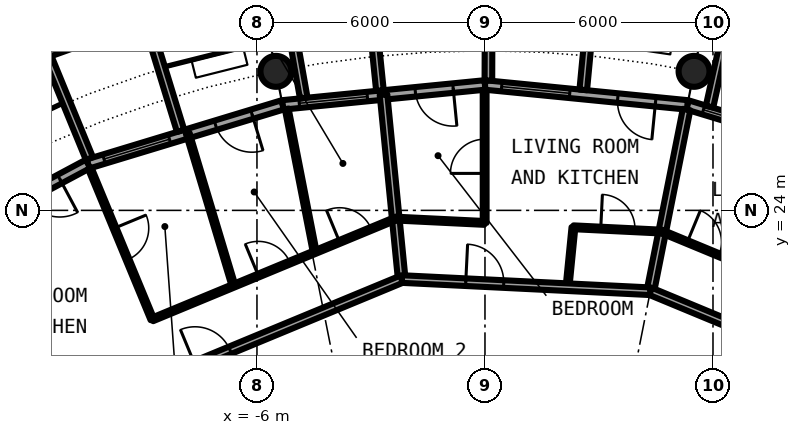
"""IFC4 building model, lengths in metres.
Left out: names, types, materials, properties, quantities, classifications, styles, units other than length and angle.
Written with IfcOpenShell. Run it as: python <this file> out.ifc"""

import sys

from ifc_helpers import new_model, si_unit, direction, frame, frame_2d, origin, origin_2d, place, context, subcontext, project, spatial, rectangle, circle, hollow_circle, extrude, element, fill, save


model = new_model("IFC4")
c1 = context("Model", 3, precision=1e-05, world=origin(), true_north=direction((0.0, 1.0)))
c2 = subcontext(c1, "Body", "Model", "MODEL_VIEW")
j1 = project(units=[si_unit("LENGTHUNIT", "METRE"), si_unit("PLANEANGLEUNIT", "RADIAN")], contexts=[c1])
p1 = place(None, origin())
s1 = spatial("IfcSite", under=j1, at=p1, CompositionType="ELEMENT")
p2 = place(p1, origin())
s2 = spatial("IfcBuilding", under=s1, at=p2, CompositionType="ELEMENT")
p3 = place(p2, frame((0.0, 0.0, 173.8)))
s3 = spatial("IfcBuildingStorey", under=s2, at=p3, CompositionType="ELEMENT", Elevation=173.8)
for number, where, z_axis, x_axis in (
    (1, (5.501, 27.658, 0.0), (0.0, 0.0, 1.0), (1.0, 0.0, 0.0)),
    (2, (-5.501, 27.658, 0.0), (0.0, 0.0, 1.0), (1.0, 0.0, 0.0)),
):
    element("IfcColumn", number, at=place(p3, frame(where, z_axis=z_axis, x_axis=x_axis)), inside=s3, PredefinedType="COLUMN", context=c2, shape_type="SweptSolid", body=[
        extrude(hollow_circle(Radius=0.406, WallThickness=0.04, at=origin_2d()), origin(), (0.0, 0.0, 1.0), 3.05),
    ])
p4 = place(p3, frame((10.447, 25.222, 0.0), z_axis=(0.0, 0.0, 1.0), x_axis=(-0.956965678721, 0.290201119486, 0.0)))
e3 = element("IfcWall", 3, at=p4, inside=s3, PredefinedType="SOLIDWALL", context=c2, shape_type="SweptSolid", body=[
    extrude(rectangle(XDim=5.351, YDim=0.25, at=frame_2d((2.676, 0.0))), origin(), (0.0, 0.0, 1.0), 2.7),
])
p5 = place(p4, frame((0.841, 0.0, 0.0)))
e4 = element("IfcOpeningElement", 4, at=p5, cuts=e3, PredefinedType="OPENING", context=c2, shape_type="SweptSolid", body=[
    extrude(rectangle(XDim=1.0, YDim=2.2, at=frame_2d((0.5, 1.1))), frame((0.0, 0.135, 0.0), z_axis=(0.0, -1.0, 0.0), x_axis=(1.0, 0.0, 0.0)), (0.0, 0.0, 1.0), 0.27),
])
p6 = place(p4, frame((3.111, 0.0, 0.3)))
e5 = element("IfcOpeningElement", 5, at=p6, cuts=e3, PredefinedType="OPENING", context=c2, shape_type="SweptSolid", body=[
    extrude(rectangle(XDim=1.8, YDim=2.1, at=frame_2d((0.9, 1.05))), frame((0.0, 0.135, 0.0), z_axis=(0.0, -1.0, 0.0), x_axis=(1.0, 0.0, 0.0)), (0.0, 0.0, 1.0), 0.27),
])
p7 = place(p3, frame((5.909, 26.729, -0.03), z_axis=(0.0, 0.0, 1.0), x_axis=(0.216409053917, 0.976302781612, 0.0)))
e6 = element("IfcWall", 6, at=p7, inside=s3, PredefinedType="SOLIDWALL", context=c2, shape_type="SweptSolid", body=[
    extrude(rectangle(XDim=2.925, YDim=0.2, at=frame_2d((1.463, 0.0))), origin(), (0.0, 0.0, 1.0), 2.73),
])
p8 = place(p3, frame((5.326, 26.775, 0.0), z_axis=(0.0, 0.0, 1.0), x_axis=(-0.995173996315, 0.098126026407, 0.0)))
e7 = element("IfcWall", 7, at=p8, inside=s3, PredefinedType="SOLIDWALL", context=c2, shape_type="SweptSolid", body=[
    extrude(rectangle(XDim=5.352, YDim=0.25, at=frame_2d((2.676, 0.0))), origin(), (0.0, 0.0, 1.0), 2.7),
])
p9 = place(p8, frame((0.841, 0.0, 0.0)))
e8 = element("IfcOpeningElement", 8, at=p9, cuts=e7, PredefinedType="OPENING", context=c2, shape_type="SweptSolid", body=[
    extrude(rectangle(XDim=1.0, YDim=2.2, at=frame_2d((0.5, 1.1))), frame((0.0, 0.135, 0.0), z_axis=(0.0, -1.0, 0.0), x_axis=(1.0, 0.0, 0.0)), (0.0, 0.0, 1.0), 0.27),
])
p10 = place(p8, frame((3.111, 0.0, 0.3)))
e9 = element("IfcOpeningElement", 9, at=p10, cuts=e7, PredefinedType="OPENING", context=c2, shape_type="SweptSolid", body=[
    extrude(rectangle(XDim=1.8, YDim=2.1, at=frame_2d((0.9, 1.05))), frame((0.0, 0.135, 0.0), z_axis=(0.0, -1.0, 0.0), x_axis=(1.0, 0.0, 0.0)), (0.0, 0.0, 1.0), 0.27),
])
p11 = place(p3, frame((2.586, 27.171, -0.03), z_axis=(0.0, 0.0, 1.0), x_axis=(0.094548432284, 0.995520262954, 0.0)))
e10 = element("IfcWall", 10, at=p11, inside=s3, PredefinedType="SOLIDWALL", context=c2, shape_type="SweptSolid", body=[
    extrude(rectangle(XDim=3.006, YDim=0.2, at=frame_2d((1.503, 0.0))), origin(), (0.0, 0.0, 1.0), 2.73),
])
p12 = place(p3, frame((0.09, 27.417, -0.03), z_axis=(0.0, 0.0, 1.0), x_axis=(0.00347308367, 0.999993968827, 0.0)))
e11 = element("IfcWall", 11, at=p12, inside=s3, PredefinedType="SOLIDWALL", context=c2, shape_type="SweptSolid", body=[
    extrude(rectangle(XDim=2.882, YDim=0.2, at=frame_2d((1.441, 0.0))), origin(), (0.0, 0.0, 1.0), 2.73),
])
p13 = place(p3, frame((0.0, 27.3, 0.0), z_axis=(0.0, 0.0, 1.0), x_axis=(-0.995173996315, -0.098126026407, 0.0)))
e12 = element("IfcWall", 12, at=p13, inside=s3, PredefinedType="SOLIDWALL", context=c2, shape_type="SweptSolid", body=[
    extrude(rectangle(XDim=5.352, YDim=0.25, at=frame_2d((2.676, 0.0))), origin(), (0.0, 0.0, 1.0), 2.7),
])
p14 = place(p13, frame((0.841, 0.0, 0.0)))
e13 = element("IfcOpeningElement", 13, at=p14, cuts=e12, PredefinedType="OPENING", context=c2, shape_type="SweptSolid", body=[
    extrude(rectangle(XDim=1.0, YDim=2.2, at=frame_2d((0.5, 1.1))), frame((0.0, 0.135, 0.0), z_axis=(0.0, -1.0, 0.0), x_axis=(1.0, 0.0, 0.0)), (0.0, 0.0, 1.0), 0.27),
])
p15 = place(p13, frame((3.111, 0.0, 0.3)))
e14 = element("IfcOpeningElement", 14, at=p15, cuts=e12, PredefinedType="OPENING", context=c2, shape_type="SweptSolid", body=[
    extrude(rectangle(XDim=1.8, YDim=2.1, at=frame_2d((0.9, 1.05))), frame((0.0, 0.135, 0.0), z_axis=(0.0, -1.0, 0.0), x_axis=(1.0, 0.0, 0.0)), (0.0, 0.0, 1.0), 0.27),
])
p16 = place(p3, frame((-2.764, 27.153, -0.03), z_axis=(0.0, 0.0, 1.0), x_axis=(-0.101505487237, 0.994834979311, 0.0)))
e15 = element("IfcWall", 15, at=p16, inside=s3, PredefinedType="SOLIDWALL", context=c2, shape_type="SweptSolid", body=[
    extrude(rectangle(XDim=3.007, YDim=0.2, at=frame_2d((1.503, 0.0))), origin(), (0.0, 0.0, 1.0), 2.73),
])
p17 = place(p3, frame((-4.769, 26.956, -0.03), z_axis=(0.0, 0.0, 1.0), x_axis=(-0.174056778901, 0.984735618183, 0.0)))
e16 = element("IfcWall", 16, at=p17, inside=s3, PredefinedType="SOLIDWALL", context=c2, shape_type="SweptSolid", body=[
    extrude(rectangle(XDim=2.925, YDim=0.2, at=frame_2d((1.462, 0.0))), origin(), (0.0, 0.0, 1.0), 2.73),
])
p18 = place(p3, frame((-5.326, 26.775, 0.0), z_axis=(0.0, 0.0, 1.0), x_axis=(-0.956965678721, -0.290201119486, 0.0)))
e17 = element("IfcWall", 17, at=p18, inside=s3, PredefinedType="SOLIDWALL", context=c2, shape_type="SweptSolid", body=[
    extrude(rectangle(XDim=5.351, YDim=0.25, at=frame_2d((2.676, 0.0))), origin(), (0.0, 0.0, 1.0), 2.7),
])
p19 = place(p18, frame((0.841, 0.0, 0.0)))
e18 = element("IfcOpeningElement", 18, at=p19, cuts=e17, PredefinedType="OPENING", context=c2, shape_type="SweptSolid", body=[
    extrude(rectangle(XDim=1.0, YDim=2.2, at=frame_2d((0.5, 1.1))), frame((0.0, 0.135, 0.0), z_axis=(0.0, -1.0, 0.0), x_axis=(1.0, 0.0, 0.0)), (0.0, 0.0, 1.0), 0.27),
])
p20 = place(p18, frame((3.111, 0.0, 0.3)))
e19 = element("IfcOpeningElement", 19, at=p20, cuts=e17, PredefinedType="OPENING", context=c2, shape_type="SweptSolid", body=[
    extrude(rectangle(XDim=1.8, YDim=2.1, at=frame_2d((0.9, 1.05))), frame((0.0, 0.135, 0.0), z_axis=(0.0, -1.0, 0.0), x_axis=(1.0, 0.0, 0.0)), (0.0, 0.0, 1.0), 0.27),
])
p21 = place(p3, frame((-8.82, 29.093, -0.03), z_axis=(0.0, 0.0, 1.0), x_axis=(-0.941461077774, -0.337121697664, 0.0)))
e20 = element("IfcWall", 20, at=p21, inside=s3, PredefinedType="SOLIDWALL", context=c2, shape_type="SweptSolid", body=[
    extrude(rectangle(XDim=2.993, YDim=0.2, at=frame_2d((1.497, 0.0))), origin(), (0.0, 0.0, 1.0), 2.73),
])
p22 = place(p21, frame((0.457, 0.0, 0.33)))
e21 = element("IfcOpeningElement", 21, at=p22, cuts=e20, PredefinedType="OPENING", context=c2, shape_type="SweptSolid", body=[
    extrude(circle(Radius=1.04, at=frame_2d((1.04, 1.04))), frame((0.0, 0.11, 0.0), z_axis=(0.0, -1.0, 0.0), x_axis=(1.0, 0.0, 0.0)), (0.0, 0.0, 1.0), 0.22),
])
p23 = place(p3, frame((-8.009, 26.092, -0.03), z_axis=(0.0, 0.0, 1.0), x_axis=(-0.293406695073, 0.955987715029, 0.0)))
e22 = element("IfcWall", 22, at=p23, inside=s3, PredefinedType="SOLIDWALL", context=c2, shape_type="SweptSolid", body=[
    extrude(rectangle(XDim=3.006, YDim=0.2, at=frame_2d((1.503, 0.0))), origin(), (0.0, 0.0, 1.0), 2.73),
])
p24 = place(p3, frame((-10.409, 25.364, -0.03), z_axis=(0.0, 0.0, 1.0), x_axis=(-0.379509886562, 0.925187681501, 0.0)))
e23 = element("IfcWall", 23, at=p24, inside=s3, PredefinedType="SOLIDWALL", context=c2, shape_type="SweptSolid", body=[
    extrude(rectangle(XDim=2.883, YDim=0.2, at=frame_2d((1.441, 0.0))), origin(), (0.0, 0.0, 1.0), 2.73),
])
p25 = place(p3, frame((-10.447, 25.222, 0.0), z_axis=(0.0, 0.0, 1.0), x_axis=(-0.881915646801, -0.471407246368, 0.0)))
e24 = element("IfcWall", 24, at=p25, inside=s3, PredefinedType="SOLIDWALL", context=c2, shape_type="SweptSolid", body=[
    extrude(rectangle(XDim=5.352, YDim=0.25, at=frame_2d((2.676, 0.0))), origin(), (0.0, 0.0, 1.0), 2.7),
])
p26 = place(p25, frame((0.841, 0.0, 0.0)))
e25 = element("IfcOpeningElement", 25, at=p26, cuts=e24, PredefinedType="OPENING", context=c2, shape_type="SweptSolid", body=[
    extrude(rectangle(XDim=1.0, YDim=2.2, at=frame_2d((0.5, 1.1))), frame((0.0, 0.135, 0.0), z_axis=(0.0, -1.0, 0.0), x_axis=(1.0, 0.0, 0.0)), (0.0, 0.0, 1.0), 0.27),
])
p27 = place(p25, frame((3.111, 0.0, 0.3)))
e26 = element("IfcOpeningElement", 26, at=p27, cuts=e24, PredefinedType="OPENING", context=c2, shape_type="SweptSolid", body=[
    extrude(rectangle(XDim=1.8, YDim=2.1, at=frame_2d((0.9, 1.05))), frame((0.0, 0.135, 0.0), z_axis=(0.0, -1.0, 0.0), x_axis=(1.0, 0.0, 0.0)), (0.0, 0.0, 1.0), 0.27),
])
p28 = place(p3, frame((-10.399, 25.106, 0.0), z_axis=(0.0, 0.0, 1.0), x_axis=(0.382689142274, -0.923877167369, 0.0)))
e27 = element("IfcWall", 27, at=p28, inside=s3, PredefinedType="PARTITIONING", context=c2, shape_type="SweptSolid", body=[
    extrude(rectangle(XDim=4.304, YDim=0.1, at=frame_2d((2.152, 0.0))), origin(), (0.0, 0.0, 1.0), 2.7),
])
p29 = place(p28, frame((1.702, 0.0, 0.0)))
e28 = element("IfcOpeningElement", 28, at=p29, cuts=e27, PredefinedType="OPENING", context=c2, shape_type="SweptSolid", body=[
    extrude(rectangle(XDim=0.9, YDim=2.3, at=frame_2d((0.45, 1.15))), frame((0.0, 0.06, 0.0), z_axis=(0.0, -1.0, 0.0), x_axis=(1.0, 0.0, 0.0)), (0.0, 0.0, 1.0), 0.12),
])
p30 = place(p3, frame((-7.821, 26.025, 0.0), z_axis=(0.0, 0.0, 1.0), x_axis=(0.287802539521, -0.957689771401, 0.0)))
e29 = element("IfcWall", 29, at=p30, inside=s3, PredefinedType="PARTITIONING", context=c2, shape_type="SweptSolid", body=[
    extrude(rectangle(XDim=4.187, YDim=0.1, at=frame_2d((2.094, 0.0))), origin(), (0.0, 0.0, 1.0), 2.7),
])
p31 = place(p3, frame((-5.217, 26.67, 0.0), z_axis=(0.0, 0.0, 1.0), x_axis=(0.192118055779, -0.981371821811, 0.0)))
e30 = element("IfcWall", 30, at=p31, inside=s3, PredefinedType="PARTITIONING", context=c2, shape_type="SweptSolid", body=[
    extrude(rectangle(XDim=3.842, YDim=0.1, at=frame_2d((1.921, 0.0))), origin(), (0.0, 0.0, 1.0), 2.7),
])
p32 = place(p3, frame((-2.67, 27.043, 0.0), z_axis=(0.0, 0.0, 1.0), x_axis=(0.098263949654, -0.995160387173, 0.0)))
e31 = element("IfcWall", 31, at=p32, inside=s3, PredefinedType="PARTITIONING", context=c2, shape_type="SweptSolid", body=[
    extrude(rectangle(XDim=4.875, YDim=0.2, at=frame_2d((2.438, 0.0))), origin(), (0.0, 0.0, 1.0), 2.7),
])
p33 = place(p3, frame((-0.008, 23.67, 0.0), z_axis=(0.0, 0.0, 1.0), x_axis=(-0.000278609727, 0.999999961188, 0.0)))
e32 = element("IfcWall", 32, at=p33, inside=s3, PredefinedType="PARTITIONING", context=c2, shape_type="SweptSolid", body=[
    extrude(rectangle(XDim=3.505, YDim=0.1, at=frame_2d((1.752, 0.0))), origin(), (0.0, 0.0, 1.0), 2.7),
])
p34 = place(p33, frame((1.303, 0.0, 0.0)))
e33 = element("IfcOpeningElement", 33, at=p34, cuts=e32, PredefinedType="OPENING", context=c2, shape_type="SweptSolid", body=[
    extrude(rectangle(XDim=0.9, YDim=2.3, at=frame_2d((0.45, 1.15))), frame((0.0, 0.06, 0.0), z_axis=(0.0, -1.0, 0.0), x_axis=(1.0, 0.0, 0.0)), (0.0, 0.0, 1.0), 0.12),
])
p35 = place(p3, frame((2.172, 21.979, 0.0), z_axis=(0.0, 0.0, 1.0), x_axis=(0.098358845227, 0.995151012443, 0.0)))
e34 = element("IfcWall", 34, at=p35, inside=s3, PredefinedType="PARTITIONING", context=c2, shape_type="SweptSolid", body=[
    extrude(rectangle(XDim=1.583, YDim=0.1, at=frame_2d((0.792, 0.0))), origin(), (0.0, 0.0, 1.0), 2.7),
])
p36 = place(p3, frame((4.352, 21.872, 0.0), z_axis=(0.0, 0.0, 1.0), x_axis=(0.195268525521, 0.980749816692, 0.0)))
e35 = element("IfcWall", 35, at=p36, inside=s3, PredefinedType="PARTITIONING", context=c2, shape_type="SweptSolid", body=[
    extrude(rectangle(XDim=4.875, YDim=0.2, at=frame_2d((2.438, 0.0))), origin(), (0.0, 0.0, 1.0), 2.7),
])
p37 = place(p3, frame((-14.147, 17.238, 0.0), z_axis=(0.0, 0.0, 1.0), x_axis=(0.923860535822, 0.382729291212, 0.0)))
e36 = element("IfcWall", 36, at=p37, inside=s3, PredefinedType="PARTITIONING", context=c2, shape_type="SweptSolid", body=[
    extrude(rectangle(XDim=12.947, YDim=0.2, at=frame_2d((6.473, 0.0))), origin(), (0.0, 0.0, 1.0), 2.7),
])
p38 = place(p37, frame((7.053, 0.0, 0.0)))
e37 = element("IfcOpeningElement", 37, at=p38, cuts=e36, PredefinedType="OPENING", context=c2, shape_type="SweptSolid", body=[
    extrude(rectangle(XDim=1.0, YDim=2.3, at=frame_2d((0.5, 1.15))), frame((0.0, 0.11, 0.0), z_axis=(0.0, -1.0, 0.0), x_axis=(1.0, 0.0, 0.0)), (0.0, 0.0, 1.0), 0.22),
])
p39 = place(p3, frame((4.351, 21.872, 0.0), z_axis=(0.0, 0.0, 1.0), x_axis=(0.923722518166, -0.383062278792, 0.0)))
e38 = element("IfcWall", 38, at=p39, inside=s3, PredefinedType="PARTITIONING", context=c2, shape_type="SweptSolid", body=[
    extrude(rectangle(XDim=8.709, YDim=0.2, at=frame_2d((4.354, 0.0))), origin(), (0.0, 0.0, 1.0), 2.7),
])
p40 = place(p39, frame((4.938, 0.0, 0.0)))
e39 = element("IfcOpeningElement", 39, at=p40, cuts=e38, PredefinedType="OPENING", context=c2, shape_type="SweptSolid", body=[
    extrude(rectangle(XDim=1.0, YDim=2.3, at=frame_2d((0.5, 1.15))), frame((0.0, 0.11, 0.0), z_axis=(0.0, -1.0, 0.0), x_axis=(1.0, 0.0, 0.0)), (0.0, 0.0, 1.0), 0.22),
])
p41 = place(p3, frame((-2.186, 22.193, 0.0), z_axis=(0.0, 0.0, 1.0), x_axis=(0.998796224858, -0.049052025534, 0.0)))
e40 = element("IfcWall", 40, at=p41, inside=s3, PredefinedType="PARTITIONING", context=c2, shape_type="SweptSolid", body=[
    extrude(rectangle(XDim=6.545, YDim=0.2, at=frame_2d((3.272, 0.0))), origin(), (0.0, 0.0, 1.0), 2.7),
])
p42 = place(p41, frame((1.682, 0.0, 0.0)))
e41 = element("IfcOpeningElement", 41, at=p42, cuts=e40, PredefinedType="OPENING", context=c2, shape_type="SweptSolid", body=[
    extrude(rectangle(XDim=1.0, YDim=2.3, at=frame_2d((0.5, 1.15))), frame((0.0, 0.11, 0.0), z_axis=(0.0, -1.0, 0.0), x_axis=(1.0, 0.0, 0.0)), (0.0, 0.0, 1.0), 0.22),
])
p43 = place(p3, frame((-8.75, 21.131, 0.0), z_axis=(0.0, 0.0, 1.0), x_axis=(0.923964526154, 0.382478175075, 0.0)))
e42 = element("IfcWall", 42, at=p43, inside=s3, PredefinedType="PARTITIONING", context=c2, shape_type="SweptSolid", body=[
    extrude(rectangle(XDim=6.938, YDim=0.1, at=frame_2d((3.469, 0.0))), origin(), (0.0, 0.0, 1.0), 2.7),
])
p44 = place(p43, frame((3.015, 0.0, 0.0)))
e43 = element("IfcOpeningElement", 43, at=p44, cuts=e42, PredefinedType="OPENING", context=c2, shape_type="SweptSolid", body=[
    extrude(rectangle(XDim=0.9, YDim=2.3, at=frame_2d((0.45, 1.15))), frame((0.0, 0.06, 0.0), z_axis=(0.0, -1.0, 0.0), x_axis=(1.0, 0.0, 0.0)), (0.0, 0.0, 1.0), 0.12),
])
p45 = place(p43, frame((5.33, 0.0, 0.0)))
e44 = element("IfcOpeningElement", 44, at=p45, cuts=e42, PredefinedType="OPENING", context=c2, shape_type="SweptSolid", body=[
    extrude(rectangle(XDim=0.9, YDim=2.3, at=frame_2d((0.45, 1.15))), frame((0.0, 0.06, 0.0), z_axis=(0.0, -1.0, 0.0), x_axis=(1.0, 0.0, 0.0)), (0.0, 0.0, 1.0), 0.12),
])
p46 = place(p3, frame((4.663, 23.44, 0.0), z_axis=(0.0, 0.0, 1.0), x_axis=(0.923923664861, -0.382576870068, 0.0)))
e45 = element("IfcWall", 45, at=p46, inside=s3, PredefinedType="PARTITIONING", context=c2, shape_type="SweptSolid", body=[
    extrude(rectangle(XDim=2.331, YDim=0.1, at=frame_2d((1.166, 0.0))), origin(), (0.0, 0.0, 1.0), 2.7),
])
p47 = place(p46, frame((0.715, 0.0, 0.0)))
e46 = element("IfcOpeningElement", 46, at=p47, cuts=e45, PredefinedType="OPENING", context=c2, shape_type="SweptSolid", body=[
    extrude(rectangle(XDim=0.9, YDim=2.3, at=frame_2d((0.45, 1.15))), frame((0.0, 0.06, 0.0), z_axis=(0.0, -1.0, 0.0), x_axis=(1.0, 0.0, 0.0)), (0.0, 0.0, 1.0), 0.12),
])
p48 = place(p3, frame((-2.353, 23.784, 0.0), z_axis=(0.0, 0.0, 1.0), x_axis=(0.998809994762, -0.048770835169, 0.0)))
e47 = element("IfcWall", 47, at=p48, inside=s3, PredefinedType="PARTITIONING", context=c2, shape_type="SweptSolid", body=[
    extrude(rectangle(XDim=2.338, YDim=0.1, at=frame_2d((1.169, 0.0))), origin(), (0.0, 0.0, 1.0), 2.7),
])
p49 = place(p3, frame((2.328, 23.555, 0.0), z_axis=(0.0, 0.0, 1.0), x_axis=(0.99881024313, -0.04876574841, 0.0)))
e48 = element("IfcWall", 48, at=p49, inside=s3, PredefinedType="PARTITIONING", context=c2, shape_type="SweptSolid", body=[
    extrude(rectangle(XDim=2.338, YDim=0.1, at=frame_2d((1.169, 0.0))), origin(), (0.0, 0.0, 1.0), 2.7),
])
p50 = place(p49, frame((0.719, 0.0, 0.0)))
e49 = element("IfcOpeningElement", 49, at=p50, cuts=e48, PredefinedType="OPENING", context=c2, shape_type="SweptSolid", body=[
    extrude(rectangle(XDim=0.9, YDim=2.3, at=frame_2d((0.45, 1.15))), frame((0.0, 0.06, 0.0), z_axis=(0.0, -1.0, 0.0), x_axis=(1.0, 0.0, 0.0)), (0.0, 0.0, 1.0), 0.12),
])
p51 = place(p6, origin())
e50 = element("IfcWindow", 50, at=p51, inside=s3, PartitioningType="SINGLE_PANEL", PredefinedType="WINDOW", context=c2, shape_type="SweptSolid", body=[
    extrude(rectangle(XDim=1.8, YDim=2.1, at=frame_2d((0.9, 1.05))), frame((0.0, 0.03, 0.0), z_axis=(0.0, -1.0, 0.0), x_axis=(1.0, 0.0, 0.0)), (0.0, 0.0, 1.0), 0.06),
])
fill(e5, e50)
p52 = place(p9, origin())
e51 = element("IfcDoor", 51, at=p52, inside=s3, OperationType="SINGLE_SWING_LEFT", PredefinedType="DOOR", context=c2, shape_type="SweptSolid", body=[
    extrude(rectangle(XDim=1.0, YDim=2.2, at=frame_2d((0.5, 1.1))), frame((0.0, 0.025, 0.0), z_axis=(0.0, -1.0, 0.0), x_axis=(1.0, 0.0, 0.0)), (0.0, 0.0, 1.0), 0.05),
])
fill(e8, e51)
p53 = place(p10, origin())
e52 = element("IfcWindow", 52, at=p53, inside=s3, PartitioningType="SINGLE_PANEL", PredefinedType="WINDOW", context=c2, shape_type="SweptSolid", body=[
    extrude(rectangle(XDim=1.8, YDim=2.1, at=frame_2d((0.9, 1.05))), frame((0.0, 0.03, 0.0), z_axis=(0.0, -1.0, 0.0), x_axis=(1.0, 0.0, 0.0)), (0.0, 0.0, 1.0), 0.06),
])
fill(e9, e52)
p54 = place(p14, origin())
e53 = element("IfcDoor", 53, at=p54, inside=s3, OperationType="SINGLE_SWING_LEFT", PredefinedType="DOOR", context=c2, shape_type="SweptSolid", body=[
    extrude(rectangle(XDim=1.0, YDim=2.2, at=frame_2d((0.5, 1.1))), frame((0.0, 0.025, 0.0), z_axis=(0.0, -1.0, 0.0), x_axis=(1.0, 0.0, 0.0)), (0.0, 0.0, 1.0), 0.05),
])
fill(e13, e53)
p55 = place(p15, origin())
e54 = element("IfcWindow", 54, at=p55, inside=s3, PartitioningType="SINGLE_PANEL", PredefinedType="WINDOW", context=c2, shape_type="SweptSolid", body=[
    extrude(rectangle(XDim=1.8, YDim=2.1, at=frame_2d((0.9, 1.05))), frame((0.0, 0.03, 0.0), z_axis=(0.0, -1.0, 0.0), x_axis=(1.0, 0.0, 0.0)), (0.0, 0.0, 1.0), 0.06),
])
fill(e14, e54)
p56 = place(p19, origin())
e55 = element("IfcDoor", 55, at=p56, inside=s3, OperationType="SINGLE_SWING_LEFT", PredefinedType="DOOR", context=c2, shape_type="SweptSolid", body=[
    extrude(rectangle(XDim=1.0, YDim=2.2, at=frame_2d((0.5, 1.1))), frame((0.0, 0.025, 0.0), z_axis=(0.0, -1.0, 0.0), x_axis=(1.0, 0.0, 0.0)), (0.0, 0.0, 1.0), 0.05),
])
fill(e18, e55)
p57 = place(p20, origin())
e56 = element("IfcWindow", 56, at=p57, inside=s3, PartitioningType="SINGLE_PANEL", PredefinedType="WINDOW", context=c2, shape_type="SweptSolid", body=[
    extrude(rectangle(XDim=1.8, YDim=2.1, at=frame_2d((0.9, 1.05))), frame((0.0, 0.03, 0.0), z_axis=(0.0, -1.0, 0.0), x_axis=(1.0, 0.0, 0.0)), (0.0, 0.0, 1.0), 0.06),
])
fill(e19, e56)
p58 = place(p26, origin())
e57 = element("IfcDoor", 57, at=p58, inside=s3, OperationType="SINGLE_SWING_LEFT", PredefinedType="DOOR", context=c2, shape_type="SweptSolid", body=[
    extrude(rectangle(XDim=1.0, YDim=2.2, at=frame_2d((0.5, 1.1))), frame((0.0, 0.025, 0.0), z_axis=(0.0, -1.0, 0.0), x_axis=(1.0, 0.0, 0.0)), (0.0, 0.0, 1.0), 0.05),
])
fill(e25, e57)
p59 = place(p47, origin())
e58 = element("IfcDoor", 58, at=p59, inside=s3, OperationType="SINGLE_SWING_LEFT", PredefinedType="DOOR", context=c2, shape_type="SweptSolid", body=[
    extrude(rectangle(XDim=0.9, YDim=2.3, at=frame_2d((0.45, 1.15))), frame((0.0, 0.025, 0.0), z_axis=(0.0, -1.0, 0.0), x_axis=(1.0, 0.0, 0.0)), (0.0, 0.0, 1.0), 0.05),
])
fill(e46, e58)
p60 = place(p42, origin())
e59 = element("IfcDoor", 59, at=p60, inside=s3, OperationType="SINGLE_SWING_LEFT", PredefinedType="DOOR", context=c2, shape_type="SweptSolid", body=[
    extrude(rectangle(XDim=1.0, YDim=2.3, at=frame_2d((0.5, 1.15))), frame((0.0, 0.025, 0.0), z_axis=(0.0, -1.0, 0.0), x_axis=(1.0, 0.0, 0.0)), (0.0, 0.0, 1.0), 0.05),
])
fill(e41, e59)
p61 = place(p50, origin())
e60 = element("IfcDoor", 60, at=p61, inside=s3, OperationType="SINGLE_SWING_RIGHT", PredefinedType="DOOR", context=c2, shape_type="SweptSolid", body=[
    extrude(rectangle(XDim=0.9, YDim=2.3, at=frame_2d((0.45, 1.15))), frame((0.0, 0.025, 0.0), z_axis=(0.0, -1.0, 0.0), x_axis=(1.0, 0.0, 0.0)), (0.0, 0.0, 1.0), 0.05),
])
fill(e49, e60)
p62 = place(p34, origin())
e61 = element("IfcDoor", 61, at=p62, inside=s3, OperationType="SINGLE_SWING_RIGHT", PredefinedType="DOOR", context=c2, shape_type="SweptSolid", body=[
    extrude(rectangle(XDim=0.9, YDim=2.3, at=frame_2d((0.45, 1.15))), frame((0.0, 0.025, 0.0), z_axis=(0.0, -1.0, 0.0), x_axis=(1.0, 0.0, 0.0)), (0.0, 0.0, 1.0), 0.05),
])
fill(e33, e61)
p63 = place(p38, origin())
e62 = element("IfcDoor", 62, at=p63, inside=s3, OperationType="SINGLE_SWING_RIGHT", PredefinedType="DOOR", context=c2, shape_type="SweptSolid", body=[
    extrude(rectangle(XDim=1.0, YDim=2.3, at=frame_2d((0.5, 1.15))), frame((0.0, 0.025, 0.0), z_axis=(0.0, -1.0, 0.0), x_axis=(1.0, 0.0, 0.0)), (0.0, 0.0, 1.0), 0.05),
])
fill(e37, e62)
p64 = place(p29, origin())
e63 = element("IfcDoor", 63, at=p64, inside=s3, OperationType="SINGLE_SWING_LEFT", PredefinedType="DOOR", context=c2, shape_type="SweptSolid", body=[
    extrude(rectangle(XDim=0.9, YDim=2.3, at=frame_2d((0.45, 1.15))), frame((0.0, 0.025, 0.0), z_axis=(0.0, -1.0, 0.0), x_axis=(1.0, 0.0, 0.0)), (0.0, 0.0, 1.0), 0.05),
])
fill(e28, e63)
p65 = place(p44, origin())
e64 = element("IfcDoor", 64, at=p65, inside=s3, OperationType="SINGLE_SWING_LEFT", PredefinedType="DOOR", context=c2, shape_type="SweptSolid", body=[
    extrude(rectangle(XDim=0.9, YDim=2.3, at=frame_2d((0.45, 1.15))), frame((0.0, 0.025, 0.0), z_axis=(0.0, -1.0, 0.0), x_axis=(1.0, 0.0, 0.0)), (0.0, 0.0, 1.0), 0.05),
])
fill(e43, e64)
p66 = place(p45, origin())
e65 = element("IfcDoor", 65, at=p66, inside=s3, OperationType="SINGLE_SWING_RIGHT", PredefinedType="DOOR", context=c2, shape_type="SweptSolid", body=[
    extrude(rectangle(XDim=0.9, YDim=2.3, at=frame_2d((0.45, 1.15))), frame((0.0, 0.025, 0.0), z_axis=(0.0, -1.0, 0.0), x_axis=(1.0, 0.0, 0.0)), (0.0, 0.0, 1.0), 0.05),
])
fill(e44, e65)
save(model, sys.argv[1])
